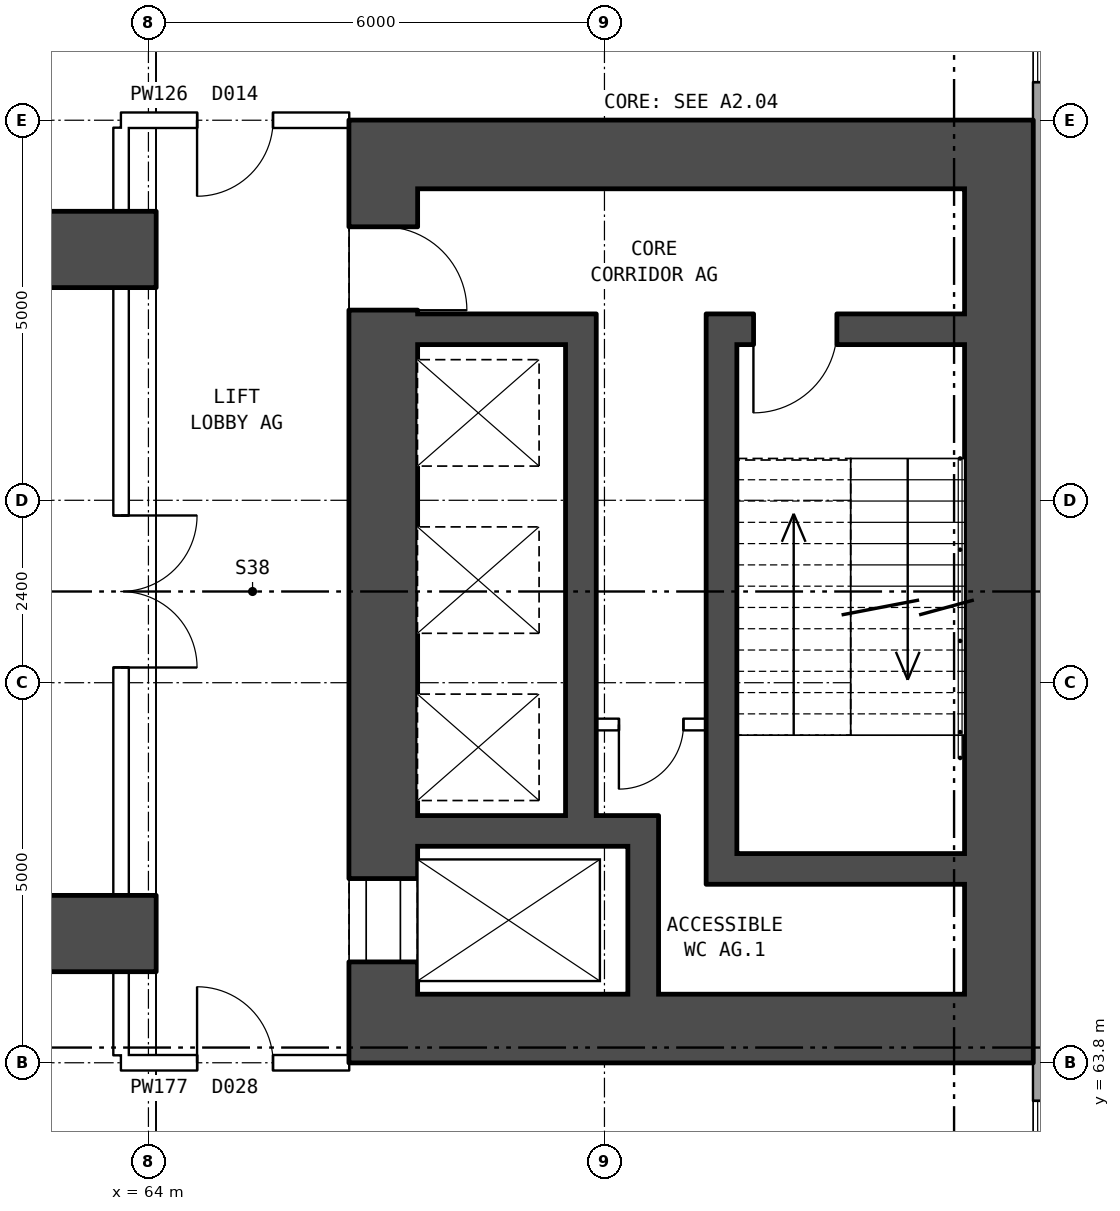
"""IFC4 building model, lengths in metres.
Left out: names, types, materials, properties, quantities, classifications, styles, units other than length and angle.
Written with IfcOpenShell. Run it as: python <this file> out.ifc"""

import sys

from ifc_helpers import new_model, si_unit, direction, frame, frame_2d, origin, place, context, subcontext, project, spatial, rectangle, extrude, element, fill, save


model = new_model("IFC4")
c1 = context("Model", 3, precision=1e-05, world=origin(), true_north=direction((0.0, 1.0)))
c2 = subcontext(c1, "Body", "Model", "MODEL_VIEW")
j1 = project(units=[si_unit("LENGTHUNIT", "METRE"), si_unit("PLANEANGLEUNIT", "RADIAN")], contexts=[c1])
p1 = place(None, origin())
s1 = spatial("IfcSite", under=j1, at=p1, CompositionType="ELEMENT")
p2 = place(p1, origin())
s2 = spatial("IfcBuilding", under=s1, at=p2, CompositionType="ELEMENT")
p3 = place(p2, frame((0.0, 0.0, 14.7)))
s3 = spatial("IfcBuildingStorey", under=s2, at=p3, CompositionType="ELEMENT", Elevation=14.7)
for number, where, z_axis, x_axis in (
    (1, (43.9, 65.5, 0.0), (0.0, 0.0, 1.0), (1.0, 0.0, 0.0)),
    (2, (43.9, 74.5, 0.0), (0.0, 0.0, 1.0), (1.0, 0.0, 0.0)),
):
    element("IfcWall", number, at=place(p3, frame(where, z_axis=z_axis, x_axis=x_axis)), inside=s3, PredefinedType="SHEAR", context=c2, shape_type="SweptSolid", body=[
        extrude(rectangle(XDim=20.2, YDim=1.0, at=frame_2d((10.1, 0.0))), origin(), (0.0, 0.0, 1.0), 4.0),
    ])
p4 = place(p3, frame((75.82, 57.075, 0.0), z_axis=(0.0, 0.0, 1.0), x_axis=(0.0, 1.0, 0.0)))
e3 = element("IfcWall", 3, at=p4, inside=s3, PredefinedType="STANDARD", context=c2, shape_type="SweptSolid", body=[
    extrude(rectangle(XDim=25.851, YDim=0.36, at=frame_2d((12.925, 0.0))), origin(), (0.0, 0.0, 1.0), 4.0),
])
p5 = place(p4, frame((1.625, 0.0, 0.8)))
e4 = element("IfcOpeningElement", 4, at=p5, cuts=e3, PredefinedType="OPENING", context=c2, shape_type="SweptSolid", body=[
    extrude(rectangle(XDim=1.6, YDim=1.8, at=frame_2d((0.8, 0.9))), frame((0.0, 0.19, 0.0), z_axis=(0.0, -1.0, 0.0), x_axis=(1.0, 0.0, 0.0)), (0.0, 0.0, 1.0), 0.38),
])
p6 = place(p4, frame((4.625, 0.0, 0.8)))
e5 = element("IfcOpeningElement", 5, at=p6, cuts=e3, PredefinedType="OPENING", context=c2, shape_type="SweptSolid", body=[
    extrude(rectangle(XDim=1.6, YDim=1.8, at=frame_2d((0.8, 0.9))), frame((0.0, 0.19, 0.0), z_axis=(0.0, -1.0, 0.0), x_axis=(1.0, 0.0, 0.0)), (0.0, 0.0, 1.0), 0.38),
])
p7 = place(p4, frame((19.625, 0.0, 0.8)))
e6 = element("IfcOpeningElement", 6, at=p7, cuts=e3, PredefinedType="OPENING", context=c2, shape_type="SweptSolid", body=[
    extrude(rectangle(XDim=1.6, YDim=1.8, at=frame_2d((0.8, 0.9))), frame((0.0, 0.19, 0.0), z_axis=(0.0, -1.0, 0.0), x_axis=(1.0, 0.0, 0.0)), (0.0, 0.0, 1.0), 0.38),
])
p8 = place(p4, frame((22.625, 0.0, 0.8)))
e7 = element("IfcOpeningElement", 7, at=p8, cuts=e3, PredefinedType="OPENING", context=c2, shape_type="SweptSolid", body=[
    extrude(rectangle(XDim=1.6, YDim=1.8, at=frame_2d((0.8, 0.9))), frame((0.0, 0.19, 0.0), z_axis=(0.0, -1.0, 0.0), x_axis=(1.0, 0.0, 0.0)), (0.0, 0.0, 1.0), 0.38),
])
p9 = place(p3, frame((67.09, 64.7, 0.0), z_axis=(0.0, 0.0, 1.0), x_axis=(0.0, 1.0, 0.0)))
e8 = element("IfcWall", 8, at=p9, inside=s3, PredefinedType="SHEAR", context=c2, shape_type="SweptSolid", body=[
    extrude(rectangle(XDim=10.6, YDim=0.9, at=frame_2d((5.3, 0.0))), origin(), (0.0, 0.0, 1.0), 4.0),
])
p10 = place(p9, frame((0.425, 0.0, 0.0)))
e9 = element("IfcOpeningElement", 9, at=p10, cuts=e8, PredefinedType="OPENING", context=c2, shape_type="SweptSolid", body=[
    extrude(rectangle(XDim=1.1, YDim=2.1, at=frame_2d((0.55, 1.05))), frame((0.0, 0.46, 0.0), z_axis=(0.0, -1.0, 0.0), x_axis=(1.0, 0.0, 0.0)), (0.0, 0.0, 1.0), 0.92),
])
p11 = place(p9, frame((9.0, 0.0, 0.0)))
e10 = element("IfcOpeningElement", 10, at=p11, cuts=e8, PredefinedType="OPENING", context=c2, shape_type="SweptSolid", body=[
    extrude(rectangle(XDim=1.1, YDim=2.1, at=frame_2d((0.55, 1.05))), frame((0.0, 0.46, 0.0), z_axis=(0.0, -1.0, 0.0), x_axis=(1.0, 0.0, 0.0)), (0.0, 0.0, 1.0), 0.92),
])
p12 = place(p3, frame((75.19, 64.7, 0.0), z_axis=(0.0, 0.0, 1.0), x_axis=(0.0, 1.0, 0.0)))
e11 = element("IfcWall", 11, at=p12, inside=s3, PredefinedType="SHEAR", context=c2, shape_type="SweptSolid", body=[
    extrude(rectangle(XDim=10.6, YDim=0.9, at=frame_2d((5.3, 0.0))), origin(), (0.0, 0.0, 1.0), 4.0),
])
for number, where, z_axis, x_axis in (
    (12, (66.64, 64.25, 0.0), (0.0, 0.0, 1.0), (1.0, 0.0, 0.0)),
    (13, (66.64, 75.75, 0.0), (0.0, 0.0, 1.0), (1.0, 0.0, 0.0)),
):
    element("IfcWall", number, at=place(p3, frame(where, z_axis=z_axis, x_axis=x_axis)), inside=s3, PredefinedType="SHEAR", context=c2, shape_type="SweptSolid", body=[
        extrude(rectangle(XDim=9.0, YDim=0.9, at=frame_2d((4.5, 0.0))), origin(), (0.0, 0.0, 1.0), 4.0),
    ])
p13 = place(p3, frame((71.74, 66.35, 0.0), z_axis=(0.0, 0.0, 1.0), x_axis=(1.0, 0.0, 0.0)))
e14 = element("IfcWall", 14, at=p13, inside=s3, PredefinedType="SHEAR", context=c2, shape_type="SweptSolid", body=[
    extrude(rectangle(XDim=3.0, YDim=0.4, at=frame_2d((1.5, 0.0))), origin(), (0.0, 0.0, 1.0), 4.0),
])
p14 = place(p3, frame((67.54, 66.85, 0.0), z_axis=(0.0, 0.0, 1.0), x_axis=(1.0, 0.0, 0.0)))
e15 = element("IfcWall", 15, at=p14, inside=s3, PredefinedType="SHEAR", context=c2, shape_type="SweptSolid", body=[
    extrude(rectangle(XDim=3.17, YDim=0.4, at=frame_2d((1.585, 0.0))), origin(), (0.0, 0.0, 1.0), 4.0),
])
p15 = place(p3, frame((69.89, 68.25, 0.0), z_axis=(0.0, 0.0, 1.0), x_axis=(1.0, 0.0, 0.0)))
e16 = element("IfcWall", 16, at=p15, inside=s3, PredefinedType="PARTITIONING", context=c2, shape_type="SweptSolid", body=[
    extrude(rectangle(XDim=1.45, YDim=0.15, at=frame_2d((0.725, 0.0))), origin(), (0.0, 0.0, 1.0), 4.0),
])
p16 = place(p15, frame((0.3, 0.0, 0.0)))
e17 = element("IfcOpeningElement", 17, at=p16, cuts=e16, PredefinedType="OPENING", context=c2, shape_type="SweptSolid", body=[
    extrude(rectangle(XDim=0.85, YDim=2.1, at=frame_2d((0.425, 1.05))), frame((0.0, 0.085, 0.0), z_axis=(0.0, -1.0, 0.0), x_axis=(1.0, 0.0, 0.0)), (0.0, 0.0, 1.0), 0.17),
])
p17 = place(p3, frame((67.54, 73.45, 0.0), z_axis=(0.0, 0.0, 1.0), x_axis=(1.0, 0.0, 0.0)))
e18 = element("IfcWall", 18, at=p17, inside=s3, PredefinedType="SHEAR", context=c2, shape_type="SweptSolid", body=[
    extrude(rectangle(XDim=1.95, YDim=0.4, at=frame_2d((0.975, 0.0))), origin(), (0.0, 0.0, 1.0), 4.0),
])
p18 = place(p3, frame((71.74, 73.45, 0.0), z_axis=(0.0, 0.0, 1.0), x_axis=(1.0, 0.0, 0.0)))
e19 = element("IfcWall", 19, at=p18, inside=s3, PredefinedType="SHEAR", context=c2, shape_type="SweptSolid", body=[
    extrude(rectangle(XDim=3.0, YDim=0.4, at=frame_2d((1.5, 0.0))), origin(), (0.0, 0.0, 1.0), 4.0),
])
p19 = place(p18, frame((0.22, 0.0, 0.0)))
e20 = element("IfcOpeningElement", 20, at=p19, cuts=e19, PredefinedType="OPENING", context=c2, shape_type="SweptSolid", body=[
    extrude(rectangle(XDim=1.1, YDim=2.1, at=frame_2d((0.55, 1.05))), frame((0.0, 0.21, 0.0), z_axis=(0.0, -1.0, 0.0), x_axis=(1.0, 0.0, 0.0)), (0.0, 0.0, 1.0), 0.42),
])
p20 = place(p3, frame((69.69, 67.05, 0.0), z_axis=(0.0, 0.0, 1.0), x_axis=(0.0, 1.0, 0.0)))
e21 = element("IfcWall", 21, at=p20, inside=s3, PredefinedType="SHEAR", context=c2, shape_type="SweptSolid", body=[
    extrude(rectangle(XDim=6.6, YDim=0.4, at=frame_2d((3.3, 0.0))), origin(), (0.0, 0.0, 1.0), 4.0),
])
p21 = place(p3, frame((70.51, 64.7, 0.0), z_axis=(0.0, 0.0, 1.0), x_axis=(0.0, 1.0, 0.0)))
e22 = element("IfcWall", 22, at=p21, inside=s3, PredefinedType="SHEAR", context=c2, shape_type="SweptSolid", body=[
    extrude(rectangle(XDim=1.95, YDim=0.4, at=frame_2d((0.975, 0.0))), origin(), (0.0, 0.0, 1.0), 4.0),
])
p22 = place(p3, frame((71.54, 66.15, 0.0), z_axis=(0.0, 0.0, 1.0), x_axis=(0.0, 1.0, 0.0)))
e23 = element("IfcWall", 23, at=p22, inside=s3, PredefinedType="SHEAR", context=c2, shape_type="SweptSolid", body=[
    extrude(rectangle(XDim=7.5, YDim=0.4, at=frame_2d((3.75, 0.0))), origin(), (0.0, 0.0, 1.0), 4.0),
])
p23 = place(p3, frame((63.64, 63.9, 0.0), z_axis=(0.0, 0.0, 1.0), x_axis=(0.0, 1.0, 0.0)))
e24 = element("IfcWall", 24, at=p23, inside=s3, PredefinedType="PARTITIONING", context=c2, shape_type="SweptSolid", body=[
    extrude(rectangle(XDim=12.2, YDim=0.2, at=frame_2d((6.1, 0.0))), origin(), (0.0, 0.0, 1.0), 4.0),
])
p24 = place(p23, frame((5.1, 0.0, 0.0)))
e25 = element("IfcOpeningElement", 25, at=p24, cuts=e24, PredefinedType="OPENING", context=c2, shape_type="SweptSolid", body=[
    extrude(rectangle(XDim=2.0, YDim=2.1, at=frame_2d((1.0, 1.05))), frame((0.0, 0.11, 0.0), z_axis=(0.0, -1.0, 0.0), x_axis=(1.0, 0.0, 0.0)), (0.0, 0.0, 1.0), 0.22),
])
p25 = place(p3, frame((63.64, 63.8, 0.0), z_axis=(0.0, 0.0, 1.0), x_axis=(1.0, 0.0, 0.0)))
e26 = element("IfcWall", 26, at=p25, inside=s3, PredefinedType="PARTITIONING", context=c2, shape_type="SweptSolid", body=[
    extrude(rectangle(XDim=3.0, YDim=0.2, at=frame_2d((1.5, 0.0))), origin(), (0.0, 0.0, 1.0), 4.0),
])
p26 = place(p25, frame((1.0, 0.0, 0.0)))
e27 = element("IfcOpeningElement", 27, at=p26, cuts=e26, PredefinedType="OPENING", context=c2, shape_type="SweptSolid", body=[
    extrude(rectangle(XDim=1.0, YDim=2.1, at=frame_2d((0.5, 1.05))), frame((0.0, 0.11, 0.0), z_axis=(0.0, -1.0, 0.0), x_axis=(1.0, 0.0, 0.0)), (0.0, 0.0, 1.0), 0.22),
])
p27 = place(p3, frame((63.64, 76.2, 0.0), z_axis=(0.0, 0.0, 1.0), x_axis=(1.0, 0.0, 0.0)))
e28 = element("IfcWall", 28, at=p27, inside=s3, PredefinedType="PARTITIONING", context=c2, shape_type="SweptSolid", body=[
    extrude(rectangle(XDim=3.0, YDim=0.2, at=frame_2d((1.5, 0.0))), origin(), (0.0, 0.0, 1.0), 4.0),
])
p28 = place(p27, frame((1.0, 0.0, 0.0)))
e29 = element("IfcOpeningElement", 29, at=p28, cuts=e28, PredefinedType="OPENING", context=c2, shape_type="SweptSolid", body=[
    extrude(rectangle(XDim=1.0, YDim=2.1, at=frame_2d((0.5, 1.05))), frame((0.0, 0.11, 0.0), z_axis=(0.0, -1.0, 0.0), x_axis=(1.0, 0.0, 0.0)), (0.0, 0.0, 1.0), 0.22),
])
p29 = place(p6, origin())
e30 = element("IfcWindow", 30, at=p29, inside=s3, PartitioningType="SINGLE_PANEL", PredefinedType="WINDOW", context=c2, shape_type="SweptSolid", body=[
    extrude(rectangle(XDim=1.6, YDim=1.8, at=frame_2d((0.8, 0.9))), frame((0.0, 0.15, 0.0), z_axis=(0.0, -1.0, 0.0), x_axis=(1.0, 0.0, 0.0)), (0.0, 0.0, 1.0), 0.06),
])
fill(e5, e30)
p30 = place(p7, origin())
e31 = element("IfcWindow", 31, at=p30, inside=s3, PartitioningType="SINGLE_PANEL", PredefinedType="WINDOW", context=c2, shape_type="SweptSolid", body=[
    extrude(rectangle(XDim=1.6, YDim=1.8, at=frame_2d((0.8, 0.9))), frame((0.0, 0.15, 0.0), z_axis=(0.0, -1.0, 0.0), x_axis=(1.0, 0.0, 0.0)), (0.0, 0.0, 1.0), 0.06),
])
fill(e6, e31)
p31 = place(p10, origin())
e32 = element("IfcDoor", 32, at=p31, inside=s3, OperationType="DOUBLE_DOOR_SLIDING", PredefinedType="DOOR", context=c2, shape_type="SweptSolid", body=[
    extrude(rectangle(XDim=1.1, YDim=2.1, at=frame_2d((0.55, 1.05))), frame((0.0, -0.385, 0.0), z_axis=(0.0, -1.0, 0.0), x_axis=(1.0, 0.0, 0.0)), (0.0, 0.0, 1.0), 0.05),
])
fill(e9, e32)
p32 = place(p11, frame((1.1, 0.0, 0.0), z_axis=(0.0, 0.0, 1.0), x_axis=(-1.0, 0.0, 0.0)))
e33 = element("IfcDoor", 33, at=p32, inside=s3, OperationType="SINGLE_SWING_RIGHT", PredefinedType="DOOR", context=c2, shape_type="SweptSolid", body=[
    extrude(rectangle(XDim=1.1, YDim=2.1, at=frame_2d((0.55, 1.05))), frame((0.0, 0.435, 0.0), z_axis=(0.0, -1.0, 0.0), x_axis=(1.0, 0.0, 0.0)), (0.0, 0.0, 1.0), 0.05),
])
fill(e10, e33)
p33 = place(p19, frame((1.1, 0.0, 0.0), z_axis=(0.0, 0.0, 1.0), x_axis=(-1.0, 0.0, 0.0)))
e34 = element("IfcDoor", 34, at=p33, inside=s3, OperationType="SINGLE_SWING_RIGHT", PredefinedType="DOOR", context=c2, shape_type="SweptSolid", body=[
    extrude(rectangle(XDim=1.1, YDim=2.1, at=frame_2d((0.55, 1.05))), frame((0.0, 0.025, 0.0), z_axis=(0.0, -1.0, 0.0), x_axis=(1.0, 0.0, 0.0)), (0.0, 0.0, 1.0), 0.05),
])
fill(e20, e34)
p34 = place(p16, frame((0.85, 0.0, 0.0), z_axis=(0.0, 0.0, 1.0), x_axis=(-1.0, 0.0, 0.0)))
e35 = element("IfcDoor", 35, at=p34, inside=s3, OperationType="SINGLE_SWING_RIGHT", PredefinedType="DOOR", context=c2, shape_type="SweptSolid", body=[
    extrude(rectangle(XDim=0.85, YDim=2.1, at=frame_2d((0.425, 1.05))), frame((0.0, 0.025, 0.0), z_axis=(0.0, -1.0, 0.0), x_axis=(1.0, 0.0, 0.0)), (0.0, 0.0, 1.0), 0.05),
])
fill(e17, e35)
p35 = place(p24, frame((2.0, 0.0, 0.0), z_axis=(0.0, 0.0, 1.0), x_axis=(-1.0, 0.0, 0.0)))
e36 = element("IfcDoor", 36, at=p35, inside=s3, OperationType="DOUBLE_DOOR_SINGLE_SWING", PredefinedType="DOOR", context=c2, shape_type="SweptSolid", body=[
    extrude(rectangle(XDim=2.0, YDim=2.1, at=frame_2d((1.0, 1.05))), frame((0.0, 0.025, 0.0), z_axis=(0.0, -1.0, 0.0), x_axis=(1.0, 0.0, 0.0)), (0.0, 0.0, 1.0), 0.05),
])
fill(e25, e36)
p36 = place(p26, origin())
e37 = element("IfcDoor", 37, at=p36, inside=s3, OperationType="SINGLE_SWING_LEFT", PredefinedType="DOOR", context=c2, shape_type="SweptSolid", body=[
    extrude(rectangle(XDim=1.0, YDim=2.1, at=frame_2d((0.5, 1.05))), frame((0.0, 0.025, 0.0), z_axis=(0.0, -1.0, 0.0), x_axis=(1.0, 0.0, 0.0)), (0.0, 0.0, 1.0), 0.05),
])
fill(e27, e37)
p37 = place(p28, frame((1.0, 0.0, 0.0), z_axis=(0.0, 0.0, 1.0), x_axis=(-1.0, 0.0, 0.0)))
e38 = element("IfcDoor", 38, at=p37, inside=s3, OperationType="SINGLE_SWING_RIGHT", PredefinedType="DOOR", context=c2, shape_type="SweptSolid", body=[
    extrude(rectangle(XDim=1.0, YDim=2.1, at=frame_2d((0.5, 1.05))), frame((0.0, 0.025, 0.0), z_axis=(0.0, -1.0, 0.0), x_axis=(1.0, 0.0, 0.0)), (0.0, 0.0, 1.0), 0.05),
])
fill(e29, e38)
save(model, sys.argv[1])
